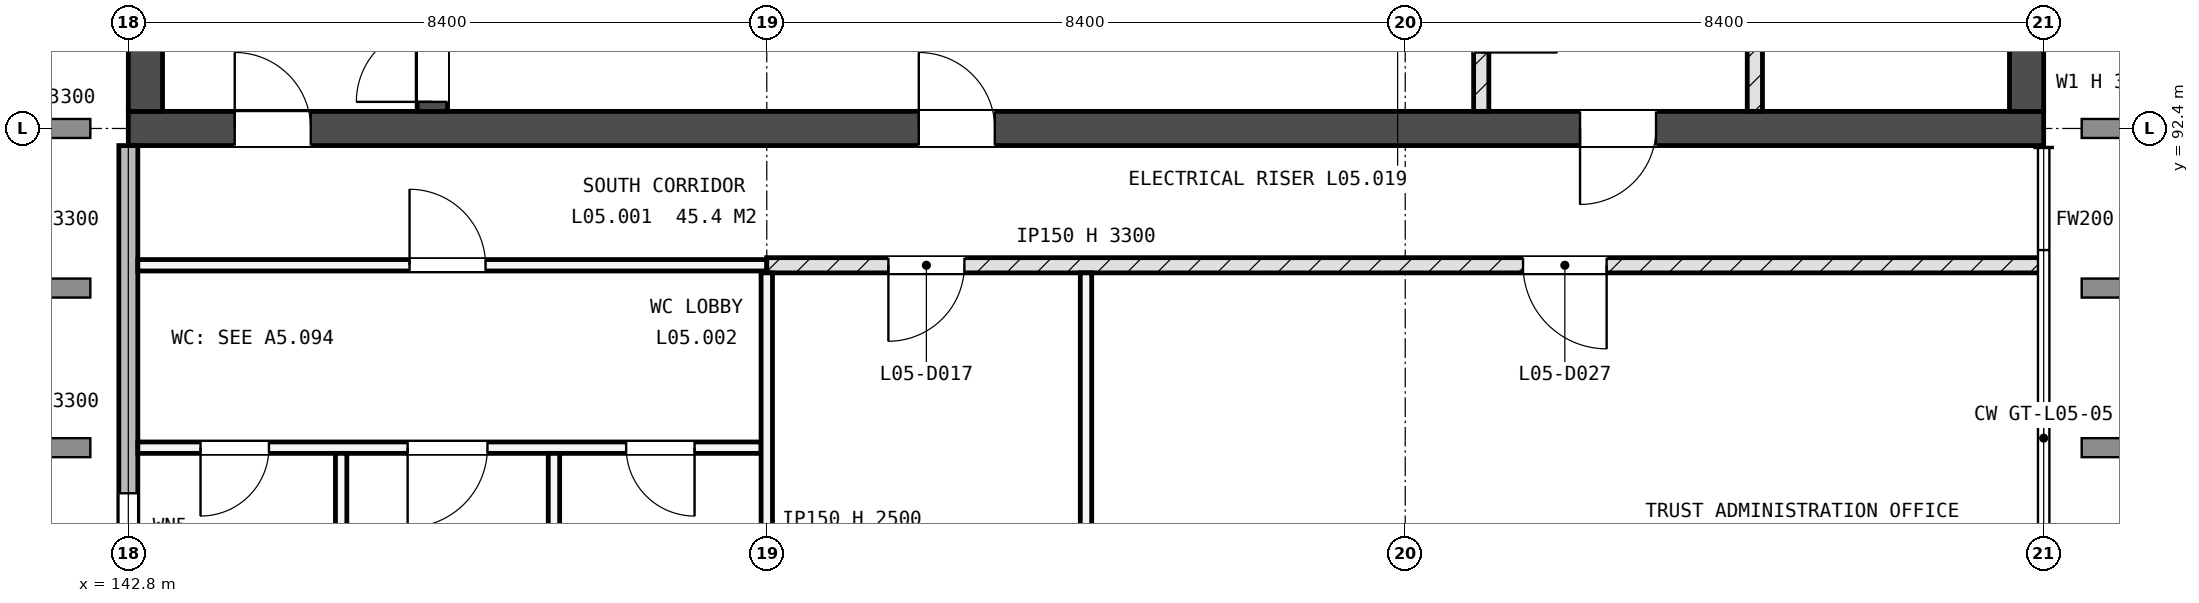
"""IFC4 building model, lengths in metres.
Left out: names, types, materials, properties, quantities, classifications, styles, units other than length and angle.
Written with IfcOpenShell. Run it as: python <this file> out.ifc"""

import sys

from ifc_helpers import new_model, si_unit, direction, frame, frame_2d, origin, place, context, subcontext, project, spatial, rectangle, extrude, element, fill, save


model = new_model("IFC4")
c1 = context("Model", 3, precision=1e-05, world=origin(), true_north=direction((0.0, 1.0)))
c2 = subcontext(c1, "Body", "Model", "MODEL_VIEW")
j1 = project(units=[si_unit("LENGTHUNIT", "METRE"), si_unit("PLANEANGLEUNIT", "RADIAN")], contexts=[c1])
p1 = place(None, origin())
s1 = spatial("IfcSite", under=j1, at=p1, CompositionType="ELEMENT")
p2 = place(p1, origin())
s2 = spatial("IfcBuilding", under=s1, at=p2, CompositionType="ELEMENT")
p3 = place(p2, frame((0.0, 0.0, 21.6)))
s3 = spatial("IfcBuildingStorey", under=s2, at=p3, CompositionType="ELEMENT", Elevation=21.6)
p4 = place(p3, frame((142.8, 92.4, -0.25), z_axis=(0.0, 0.0, 1.0), x_axis=(1.0, 0.0, 0.0)))
e1 = element("IfcWall", 1, at=p4, inside=s3, PredefinedType="SHEAR", context=c2, shape_type="SweptSolid", body=[
    extrude(rectangle(XDim=25.2, YDim=0.45, at=frame_2d((12.6, 0.0))), origin(), (0.0, 0.0, 1.0), 3.6),
])
p5 = place(p4, frame((1.4, 0.0, 0.25)))
e2 = element("IfcOpeningElement", 2, at=p5, cuts=e1, PredefinedType="OPENING", context=c2, shape_type="SweptSolid", body=[
    extrude(rectangle(XDim=1.0, YDim=2.1, at=frame_2d((0.5, 1.05))), frame((0.0, 0.235, 0.0), z_axis=(0.0, -1.0, 0.0), x_axis=(1.0, 0.0, 0.0)), (0.0, 0.0, 1.0), 0.47),
])
p6 = place(p4, frame((19.1, 0.0, 0.25)))
e3 = element("IfcOpeningElement", 3, at=p6, cuts=e1, PredefinedType="OPENING", context=c2, shape_type="SweptSolid", body=[
    extrude(rectangle(XDim=1.0, YDim=2.1, at=frame_2d((0.5, 1.05))), frame((0.0, 0.235, 0.0), z_axis=(0.0, -1.0, 0.0), x_axis=(1.0, 0.0, 0.0)), (0.0, 0.0, 1.0), 0.47),
])
p7 = place(p4, frame((10.4, 0.0, 0.25)))
e4 = element("IfcOpeningElement", 4, at=p7, cuts=e1, PredefinedType="OPENING", context=c2, shape_type="SweptSolid", body=[
    extrude(rectangle(XDim=1.0, YDim=2.1, at=frame_2d((0.5, 1.05))), frame((0.0, 0.235, 0.0), z_axis=(0.0, -1.0, 0.0), x_axis=(1.0, 0.0, 0.0)), (0.0, 0.0, 1.0), 0.47),
])
p8 = place(p3, frame((143.025, 92.625, -0.25), z_axis=(0.0, 0.0, 1.0), x_axis=(0.0, 1.0, 0.0)))
e5 = element("IfcWall", 5, at=p8, inside=s3, PredefinedType="SHEAR", context=c2, shape_type="SweptSolid", body=[
    extrude(rectangle(XDim=16.35, YDim=0.45, at=frame_2d((8.175, 0.0))), origin(), (0.0, 0.0, 1.0), 3.6),
])
p9 = place(p8, frame((2.975, 0.0, 1.85)))
e6 = element("IfcOpeningElement", 6, at=p9, cuts=e5, PredefinedType="OPENING", context=c2, shape_type="SweptSolid", body=[
    extrude(rectangle(XDim=1.2, YDim=0.9, at=frame_2d((0.6, 0.45))), frame((0.0, 0.235, 0.0), z_axis=(0.0, -1.0, 0.0), x_axis=(1.0, 0.0, 0.0)), (0.0, 0.0, 1.0), 0.47),
])
p10 = place(p3, frame((167.775, 92.625, -0.25), z_axis=(0.0, 0.0, 1.0), x_axis=(0.0, 1.0, 0.0)))
e7 = element("IfcWall", 7, at=p10, inside=s3, PredefinedType="SHEAR", context=c2, shape_type="SweptSolid", body=[
    extrude(rectangle(XDim=16.35, YDim=0.45, at=frame_2d((8.175, 0.0))), origin(), (0.0, 0.0, 1.0), 3.6),
])
p11 = place(p10, frame((12.175, 0.0, 1.85)))
e8 = element("IfcOpeningElement", 8, at=p11, cuts=e7, PredefinedType="OPENING", context=c2, shape_type="SweptSolid", body=[
    extrude(rectangle(XDim=1.2, YDim=0.9, at=frame_2d((0.6, 0.45))), frame((0.0, 0.235, 0.0), z_axis=(0.0, -1.0, 0.0), x_axis=(1.0, 0.0, 0.0)), (0.0, 0.0, 1.0), 0.47),
])
p12 = place(p3, frame((146.8, 92.625, -0.25), z_axis=(0.0, 0.0, 1.0), x_axis=(0.0, 1.0, 0.0)))
e9 = element("IfcWall", 9, at=p12, inside=s3, PredefinedType="SHEAR", context=c2, shape_type="SweptSolid", body=[
    extrude(rectangle(XDim=7.5, YDim=0.4, at=frame_2d((3.75, 0.0))), origin(), (0.0, 0.0, 1.0), 3.6),
])
p13 = place(p12, frame((0.125, 0.0, 0.25)))
e10 = element("IfcOpeningElement", 10, at=p13, cuts=e9, PredefinedType="OPENING", context=c2, shape_type="SweptSolid", body=[
    extrude(rectangle(XDim=1.0, YDim=2.1, at=frame_2d((0.5, 1.05))), frame((0.0, 0.21, 0.0), z_axis=(0.0, -1.0, 0.0), x_axis=(1.0, 0.0, 0.0)), (0.0, 0.0, 1.0), 0.42),
])
p14 = place(p3, frame((142.8, 84.5, 0.0), z_axis=(0.0, 0.0, 1.0), x_axis=(0.0, 1.0, 0.0)))
e11 = element("IfcWall", 11, at=p14, inside=s3, PredefinedType="STANDARD", context=c2, shape_type="SweptSolid", body=[
    extrude(rectangle(XDim=7.675, YDim=0.25, at=frame_2d((3.837, 0.0))), origin(), (0.0, 0.0, 1.0), 3.3),
])
p15 = place(p14, frame((2.2, 0.0, 2.1)))
e12 = element("IfcOpeningElement", 12, at=p15, cuts=e11, PredefinedType="OPENING", context=c2, shape_type="SweptSolid", body=[
    extrude(rectangle(XDim=0.9, YDim=0.6, at=frame_2d((0.45, 0.3))), frame((0.0, 0.135, 0.0), z_axis=(0.0, -1.0, 0.0), x_axis=(1.0, 0.0, 0.0)), (0.0, 0.0, 1.0), 0.27),
])
p16 = place(p3, frame((142.925, 88.2, 0.0), z_axis=(0.0, 0.0, 1.0), x_axis=(1.0, 0.0, 0.0)))
e13 = element("IfcWall", 13, at=p16, inside=s3, PredefinedType="PARTITIONING", context=c2, shape_type="SweptSolid", body=[
    extrude(rectangle(XDim=8.2, YDim=0.15, at=frame_2d((4.1, 0.0))), origin(), (0.0, 0.0, 1.0), 3.3),
])
p17 = place(p16, frame((0.825, 0.0, 0.0)))
e14 = element("IfcOpeningElement", 14, at=p17, cuts=e13, PredefinedType="OPENING", context=c2, shape_type="SweptSolid", body=[
    extrude(rectangle(XDim=0.9, YDim=2.1, at=frame_2d((0.45, 1.05))), frame((0.0, 0.085, 0.0), z_axis=(0.0, -1.0, 0.0), x_axis=(1.0, 0.0, 0.0)), (0.0, 0.0, 1.0), 0.17),
])
p18 = place(p16, frame((3.55, 0.0, 0.0)))
e15 = element("IfcOpeningElement", 15, at=p18, cuts=e13, PredefinedType="OPENING", context=c2, shape_type="SweptSolid", body=[
    extrude(rectangle(XDim=1.05, YDim=2.25, at=frame_2d((0.525, 1.125))), frame((0.0, 0.085, 0.0), z_axis=(0.0, -1.0, 0.0), x_axis=(1.0, 0.0, 0.0)), (0.0, 0.0, 1.0), 0.17),
])
p19 = place(p16, frame((6.425, 0.0, 0.0)))
e16 = element("IfcOpeningElement", 16, at=p19, cuts=e13, PredefinedType="OPENING", context=c2, shape_type="SweptSolid", body=[
    extrude(rectangle(XDim=0.9, YDim=2.1, at=frame_2d((0.45, 1.05))), frame((0.0, 0.085, 0.0), z_axis=(0.0, -1.0, 0.0), x_axis=(1.0, 0.0, 0.0)), (0.0, 0.0, 1.0), 0.17),
])
p20 = place(p3, frame((142.925, 90.6, 0.0), z_axis=(0.0, 0.0, 1.0), x_axis=(1.0, 0.0, 0.0)))
e17 = element("IfcWall", 17, at=p20, inside=s3, PredefinedType="PARTITIONING", context=c2, shape_type="SweptSolid", body=[
    extrude(rectangle(XDim=8.275, YDim=0.15, at=frame_2d((4.137, 0.0))), origin(), (0.0, 0.0, 1.0), 3.3),
])
p21 = place(p20, frame((3.575, 0.0, 0.0)))
e18 = element("IfcOpeningElement", 18, at=p21, cuts=e17, PredefinedType="OPENING", context=c2, shape_type="SweptSolid", body=[
    extrude(rectangle(XDim=1.0, YDim=2.1, at=frame_2d((0.5, 1.05))), frame((0.0, 0.085, 0.0), z_axis=(0.0, -1.0, 0.0), x_axis=(1.0, 0.0, 0.0)), (0.0, 0.0, 1.0), 0.17),
])
p22 = place(p3, frame((151.2, 90.6, 0.0), z_axis=(0.0, 0.0, 1.0), x_axis=(1.0, 0.0, 0.0)))
e19 = element("IfcWall", 19, at=p22, inside=s3, PredefinedType="SOLIDWALL", context=c2, shape_type="SweptSolid", body=[
    extrude(rectangle(XDim=16.8, YDim=0.2, at=frame_2d((8.4, 0.0))), origin(), (0.0, 0.0, 1.0), 3.3),
])
p23 = place(p22, frame((1.6, 0.0, 0.0)))
e20 = element("IfcOpeningElement", 20, at=p23, cuts=e19, PredefinedType="OPENING", context=c2, shape_type="SweptSolid", body=[
    extrude(rectangle(XDim=1.0, YDim=2.1, at=frame_2d((0.5, 1.05))), frame((0.0, 0.11, 0.0), z_axis=(0.0, -1.0, 0.0), x_axis=(1.0, 0.0, 0.0)), (0.0, 0.0, 1.0), 0.22),
])
p24 = place(p22, frame((9.95, 0.0, 0.0)))
e21 = element("IfcOpeningElement", 21, at=p24, cuts=e19, PredefinedType="OPENING", context=c2, shape_type="SweptSolid", body=[
    extrude(rectangle(XDim=1.1, YDim=2.25, at=frame_2d((0.55, 1.125))), frame((0.0, 0.11, 0.0), z_axis=(0.0, -1.0, 0.0), x_axis=(1.0, 0.0, 0.0)), (0.0, 0.0, 1.0), 0.22),
])
for number, where, z_axis, x_axis in (
    (22, (145.6, 84.125, 0.0), (0.0, 0.0, 1.0), (0.0, 1.0, 0.0)),
    (23, (148.4, 84.125, 0.0), (0.0, 0.0, 1.0), (0.0, 1.0, 0.0)),
):
    element("IfcWall", number, at=place(p3, frame(where, z_axis=z_axis, x_axis=x_axis)), inside=s3, PredefinedType="PARTITIONING", context=c2, shape_type="SweptSolid", body=[
        extrude(rectangle(XDim=4.0, YDim=0.15, at=frame_2d((2.0, 0.0))), origin(), (0.0, 0.0, 1.0), 3.3),
    ])
p25 = place(p3, frame((151.2, 84.0, 0.0), z_axis=(0.0, 0.0, 1.0), x_axis=(0.0, 1.0, 0.0)))
e24 = element("IfcWall", 24, at=p25, inside=s3, PredefinedType="PARTITIONING", context=c2, shape_type="SweptSolid", body=[
    extrude(rectangle(XDim=6.5, YDim=0.15, at=frame_2d((3.25, 0.0))), origin(), (0.0, 0.0, 1.0), 2.5),
])
p26 = place(p3, frame((155.4, 84.0, 0.0), z_axis=(0.0, 0.0, 1.0), x_axis=(0.0, 1.0, 0.0)))
e25 = element("IfcWall", 25, at=p26, inside=s3, PredefinedType="PARTITIONING", context=c2, shape_type="SweptSolid", body=[
    extrude(rectangle(XDim=6.5, YDim=0.15, at=frame_2d((3.25, 0.0))), origin(), (0.0, 0.0, 1.0), 3.3),
])
p27 = place(p3, frame((160.6, 92.625, 0.0), z_axis=(0.0, 0.0, 1.0), x_axis=(0.0, 1.0, 0.0)))
e26 = element("IfcWall", 26, at=p27, inside=s3, PredefinedType="SOLIDWALL", context=c2, shape_type="SweptSolid", body=[
    extrude(rectangle(XDim=12.475, YDim=0.2, at=frame_2d((6.238, 0.0))), origin(), (0.0, 0.0, 1.0), 3.3),
])
p28 = place(p27, frame((5.075, 0.0, 0.0)))
e27 = element("IfcOpeningElement", 27, at=p28, cuts=e26, PredefinedType="OPENING", context=c2, shape_type="SweptSolid", body=[
    extrude(rectangle(XDim=0.8, YDim=2.1, at=frame_2d((0.4, 1.05))), frame((0.0, 0.11, 0.0), z_axis=(0.0, -1.0, 0.0), x_axis=(1.0, 0.0, 0.0)), (0.0, 0.0, 1.0), 0.22),
])
p29 = place(p27, frame((0.775, 0.0, 0.0)))
e28 = element("IfcOpeningElement", 28, at=p29, cuts=e26, PredefinedType="OPENING", context=c2, shape_type="SweptSolid", body=[
    extrude(rectangle(XDim=1.0, YDim=2.1, at=frame_2d((0.5, 1.05))), frame((0.0, 0.11, 0.0), z_axis=(0.0, -1.0, 0.0), x_axis=(1.0, 0.0, 0.0)), (0.0, 0.0, 1.0), 0.22),
])
p30 = place(p3, frame((164.2, 92.625, 0.0), z_axis=(0.0, 0.0, 1.0), x_axis=(0.0, 1.0, 0.0)))
e29 = element("IfcWall", 29, at=p30, inside=s3, PredefinedType="SOLIDWALL", context=c2, shape_type="SweptSolid", body=[
    extrude(rectangle(XDim=8.725, YDim=0.2, at=frame_2d((4.363, 0.0))), origin(), (0.0, 0.0, 1.0), 3.3),
])
p31 = place(p30, frame((1.675, 0.0, 0.0)))
e30 = element("IfcOpeningElement", 30, at=p31, cuts=e29, PredefinedType="OPENING", context=c2, shape_type="SweptSolid", body=[
    extrude(rectangle(XDim=0.8, YDim=2.1, at=frame_2d((0.4, 1.05))), frame((0.0, 0.11, 0.0), z_axis=(0.0, -1.0, 0.0), x_axis=(1.0, 0.0, 0.0)), (0.0, 0.0, 1.0), 0.22),
])
p32 = place(p30, frame((6.275, 0.0, 0.0)))
e31 = element("IfcOpeningElement", 31, at=p32, cuts=e29, PredefinedType="OPENING", context=c2, shape_type="SweptSolid", body=[
    extrude(rectangle(XDim=0.8, YDim=2.1, at=frame_2d((0.4, 1.05))), frame((0.0, 0.11, 0.0), z_axis=(0.0, -1.0, 0.0), x_axis=(1.0, 0.0, 0.0)), (0.0, 0.0, 1.0), 0.22),
])
p33 = place(p15, origin())
e32 = element("IfcWindow", 32, at=p33, inside=s3, PartitioningType="SINGLE_PANEL", PredefinedType="WINDOW", context=c2, shape_type="SweptSolid", body=[
    extrude(rectangle(XDim=0.9, YDim=0.6, at=frame_2d((0.45, 0.3))), frame((0.0, 0.03, 0.0), z_axis=(0.0, -1.0, 0.0), x_axis=(1.0, 0.0, 0.0)), (0.0, 0.0, 1.0), 0.06),
])
fill(e12, e32)
p34 = place(p5, origin())
e33 = element("IfcDoor", 33, at=p34, inside=s3, OperationType="SINGLE_SWING_RIGHT", PredefinedType="DOOR", context=c2, shape_type="SweptSolid", body=[
    extrude(rectangle(XDim=1.0, YDim=2.1, at=frame_2d((0.5, 1.05))), frame((0.0, 0.025, 0.0), z_axis=(0.0, -1.0, 0.0), x_axis=(1.0, 0.0, 0.0)), (0.0, 0.0, 1.0), 0.05),
])
fill(e2, e33)
p35 = place(p13, origin())
e34 = element("IfcDoor", 34, at=p35, inside=s3, OperationType="SINGLE_SWING_RIGHT", PredefinedType="DOOR", context=c2, shape_type="SweptSolid", body=[
    extrude(rectangle(XDim=1.0, YDim=2.1, at=frame_2d((0.5, 1.05))), frame((0.0, 0.025, 0.0), z_axis=(0.0, -1.0, 0.0), x_axis=(1.0, 0.0, 0.0)), (0.0, 0.0, 1.0), 0.05),
])
fill(e10, e34)
p36 = place(p17, origin())
e35 = element("IfcDoor", 35, at=p36, inside=s3, OperationType="SINGLE_SWING_LEFT", PredefinedType="DOOR", context=c2, shape_type="SweptSolid", body=[
    extrude(rectangle(XDim=0.9, YDim=2.1, at=frame_2d((0.45, 1.05))), frame((0.0, 0.025, 0.0), z_axis=(0.0, -1.0, 0.0), x_axis=(1.0, 0.0, 0.0)), (0.0, 0.0, 1.0), 0.05),
])
fill(e14, e35)
p37 = place(p18, origin())
e36 = element("IfcDoor", 36, at=p37, inside=s3, OperationType="SINGLE_SWING_LEFT", PredefinedType="DOOR", context=c2, shape_type="SweptSolid", body=[
    extrude(rectangle(XDim=1.05, YDim=2.25, at=frame_2d((0.525, 1.125))), frame((0.0, 0.025, 0.0), z_axis=(0.0, -1.0, 0.0), x_axis=(1.0, 0.0, 0.0)), (0.0, 0.0, 1.0), 0.05),
])
fill(e15, e36)
p38 = place(p19, origin())
e37 = element("IfcDoor", 37, at=p38, inside=s3, OperationType="SINGLE_SWING_RIGHT", PredefinedType="DOOR", context=c2, shape_type="SweptSolid", body=[
    extrude(rectangle(XDim=0.9, YDim=2.1, at=frame_2d((0.45, 1.05))), frame((0.0, 0.025, 0.0), z_axis=(0.0, -1.0, 0.0), x_axis=(1.0, 0.0, 0.0)), (0.0, 0.0, 1.0), 0.05),
])
fill(e16, e37)
p39 = place(p23, origin())
e38 = element("IfcDoor", 38, at=p39, inside=s3, OperationType="SINGLE_SWING_LEFT", PredefinedType="DOOR", context=c2, shape_type="SweptSolid", body=[
    extrude(rectangle(XDim=1.0, YDim=2.1, at=frame_2d((0.5, 1.05))), frame((0.0, 0.025, 0.0), z_axis=(0.0, -1.0, 0.0), x_axis=(1.0, 0.0, 0.0)), (0.0, 0.0, 1.0), 0.05),
])
fill(e20, e38)
p40 = place(p24, origin())
e39 = element("IfcDoor", 39, at=p40, inside=s3, OperationType="SINGLE_SWING_RIGHT", PredefinedType="DOOR", context=c2, shape_type="SweptSolid", body=[
    extrude(rectangle(XDim=1.1, YDim=2.25, at=frame_2d((0.55, 1.125))), frame((0.0, 0.025, 0.0), z_axis=(0.0, -1.0, 0.0), x_axis=(1.0, 0.0, 0.0)), (0.0, 0.0, 1.0), 0.05),
])
fill(e21, e39)
p41 = place(p21, origin())
e40 = element("IfcDoor", 40, at=p41, inside=s3, OperationType="SINGLE_SWING_RIGHT", PredefinedType="DOOR", context=c2, shape_type="SweptSolid", body=[
    extrude(rectangle(XDim=1.0, YDim=2.1, at=frame_2d((0.5, 1.05))), frame((0.0, 0.025, 0.0), z_axis=(0.0, -1.0, 0.0), x_axis=(1.0, 0.0, 0.0)), (0.0, 0.0, 1.0), 0.05),
])
fill(e18, e40)
p42 = place(p6, origin())
e41 = element("IfcDoor", 41, at=p42, inside=s3, OperationType="SINGLE_SWING_LEFT", PredefinedType="DOOR", context=c2, shape_type="SweptSolid", body=[
    extrude(rectangle(XDim=1.0, YDim=2.1, at=frame_2d((0.5, 1.05))), frame((0.0, 0.025, 0.0), z_axis=(0.0, -1.0, 0.0), x_axis=(1.0, 0.0, 0.0)), (0.0, 0.0, 1.0), 0.05),
])
fill(e3, e41)
p43 = place(p7, origin())
e42 = element("IfcDoor", 42, at=p43, inside=s3, OperationType="SINGLE_SWING_RIGHT", PredefinedType="DOOR", context=c2, shape_type="SweptSolid", body=[
    extrude(rectangle(XDim=1.0, YDim=2.1, at=frame_2d((0.5, 1.05))), frame((0.0, 0.025, 0.0), z_axis=(0.0, -1.0, 0.0), x_axis=(1.0, 0.0, 0.0)), (0.0, 0.0, 1.0), 0.05),
])
fill(e4, e42)
save(model, sys.argv[1])
